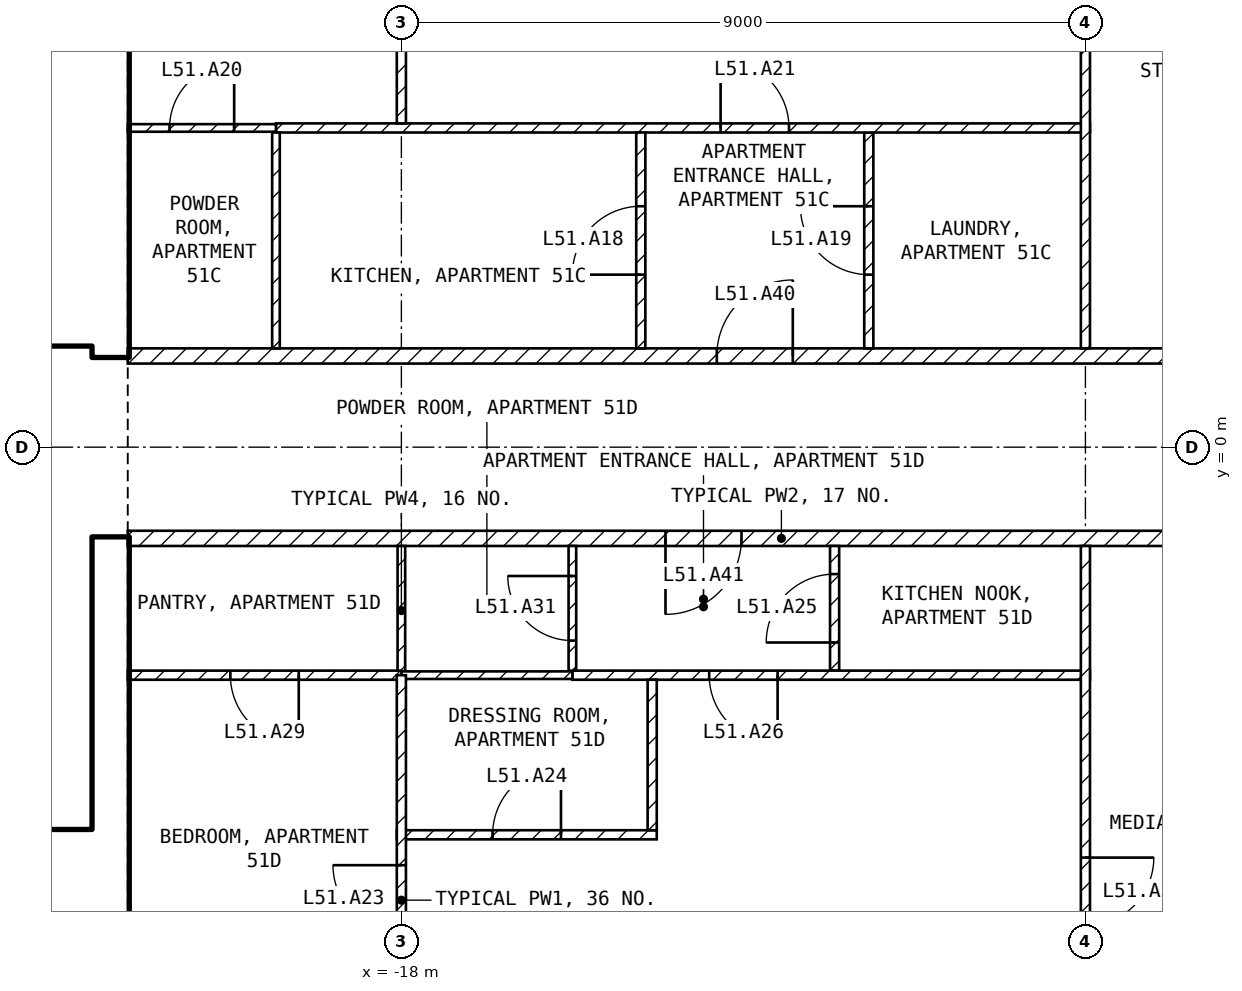
"""IFC4 building model, lengths in metres.
Left out: names, types, materials, properties, quantities, classifications, styles, units other than length and angle.
Written with IfcOpenShell. Run it as: python <this file> out.ifc"""

import sys

from ifc_helpers import new_model, si_unit, direction, frame, frame_2d, origin, place, context, subcontext, project, spatial, rectangle, extrude, element, fill, save


model = new_model("IFC4")
c1 = context("Model", 3, precision=1e-05, world=origin(), true_north=direction((0.0, 1.0)))
c2 = subcontext(c1, "Body", "Model", "MODEL_VIEW")
j1 = project(units=[si_unit("LENGTHUNIT", "METRE"), si_unit("PLANEANGLEUNIT", "RADIAN")], contexts=[c1])
p1 = place(None, origin())
s1 = spatial("IfcSite", under=j1, at=p1, CompositionType="ELEMENT")
p2 = place(p1, origin())
s2 = spatial("IfcBuilding", under=s1, at=p2, CompositionType="ELEMENT")
p3 = place(p2, frame((0.0, 0.0, 205.1)))
s3 = spatial("IfcBuildingStorey", under=s2, at=p3, CompositionType="ELEMENT", Elevation=205.1)
for number, where, z_axis, x_axis in (
    (1, (-21.825, -8.1, 0.0), (0.0, 0.0, 1.0), (0.0, 1.0, 0.0)),
    (2, (-21.825, 1.2, 0.0), (0.0, 0.0, 1.0), (0.0, 1.0, 0.0)),
):
    element("IfcWall", number, at=place(p3, frame(where, z_axis=z_axis, x_axis=x_axis)), inside=s3, PredefinedType="SHEAR", context=c2, shape_type="SweptSolid", body=[
        extrude(rectangle(XDim=6.9, YDim=0.45, at=frame_2d((3.45, 0.0))), origin(), (0.0, 0.0, 1.0), 3.25),
    ])
p4 = place(p3, frame((-33.2, 1.45, 0.0), z_axis=(0.0, 0.0, 1.0), x_axis=(1.0, 0.0, 0.0)))
e3 = element("IfcWall", 3, at=p4, inside=s3, PredefinedType="SOLIDWALL", context=c2, shape_type="SweptSolid", body=[
    extrude(rectangle(XDim=11.15, YDim=0.2, at=frame_2d((5.575, 0.0))), origin(), (0.0, 0.0, 1.0), 3.25),
])
p5 = place(p4, frame((9.4, 0.0, 0.0)))
e4 = element("IfcOpeningElement", 4, at=p5, cuts=e3, PredefinedType="OPENING", context=c2, shape_type="SweptSolid", body=[
    extrude(rectangle(XDim=1.0, YDim=2.1, at=frame_2d((0.5, 1.05))), frame((0.0, 0.11, 0.0), z_axis=(0.0, -1.0, 0.0), x_axis=(1.0, 0.0, 0.0)), (0.0, 0.0, 1.0), 0.22),
])
p6 = place(p4, frame((6.9, 0.0, 0.0)))
e5 = element("IfcOpeningElement", 5, at=p6, cuts=e3, PredefinedType="OPENING", context=c2, shape_type="SweptSolid", body=[
    extrude(rectangle(XDim=1.0, YDim=2.1, at=frame_2d((0.5, 1.05))), frame((0.0, 0.11, 0.0), z_axis=(0.0, -1.0, 0.0), x_axis=(1.0, 0.0, 0.0)), (0.0, 0.0, 1.0), 0.22),
])
p7 = place(p4, frame((1.1, 0.0, 0.0)))
e6 = element("IfcOpeningElement", 6, at=p7, cuts=e3, PredefinedType="OPENING", context=c2, shape_type="SweptSolid", body=[
    extrude(rectangle(XDim=0.9, YDim=2.1, at=frame_2d((0.45, 1.05))), frame((0.0, 0.11, 0.0), z_axis=(0.0, -1.0, 0.0), x_axis=(1.0, 0.0, 0.0)), (0.0, 0.0, 1.0), 0.22),
])
p8 = place(p3, frame((-28.35, 5.15, 0.0), z_axis=(0.0, 0.0, 1.0), x_axis=(1.0, 0.0, 0.0)))
e7 = element("IfcWall", 7, at=p8, inside=s3, PredefinedType="SOLIDWALL", context=c2, shape_type="SweptSolid", body=[
    extrude(rectangle(XDim=6.3, YDim=0.2, at=frame_2d((3.15, 0.0))), origin(), (0.0, 0.0, 1.0), 3.25),
])
p9 = place(p8, frame((5.1, 0.0, 0.0)))
e8 = element("IfcOpeningElement", 8, at=p9, cuts=e7, PredefinedType="OPENING", context=c2, shape_type="SweptSolid", body=[
    extrude(rectangle(XDim=1.0, YDim=2.1, at=frame_2d((0.5, 1.05))), frame((0.0, 0.11, 0.0), z_axis=(0.0, -1.0, 0.0), x_axis=(1.0, 0.0, 0.0)), (0.0, 0.0, 1.0), 0.22),
])
p10 = place(p3, frame((-28.35, -5.15, 0.0), z_axis=(0.0, 0.0, 1.0), x_axis=(1.0, 0.0, 0.0)))
e9 = element("IfcWall", 9, at=p10, inside=s3, PredefinedType="SOLIDWALL", context=c2, shape_type="SweptSolid", body=[
    extrude(rectangle(XDim=6.3, YDim=0.2, at=frame_2d((3.15, 0.0))), origin(), (0.0, 0.0, 1.0), 3.25),
])
p11 = place(p10, frame((5.1, 0.0, 0.0)))
e10 = element("IfcOpeningElement", 10, at=p11, cuts=e9, PredefinedType="OPENING", context=c2, shape_type="SweptSolid", body=[
    extrude(rectangle(XDim=1.0, YDim=2.1, at=frame_2d((0.5, 1.05))), frame((0.0, 0.11, 0.0), z_axis=(0.0, -1.0, 0.0), x_axis=(1.0, 0.0, 0.0)), (0.0, 0.0, 1.0), 0.22),
])
p12 = place(p3, frame((-21.6, 1.2, 0.0), z_axis=(0.0, 0.0, 1.0), x_axis=(1.0, 0.0, 0.0)))
e11 = element("IfcWall", 11, at=p12, inside=s3, PredefinedType="PARTITIONING", context=c2, shape_type="SweptSolid", body=[
    extrude(rectangle(XDim=17.2, YDim=0.2, at=frame_2d((8.6, 0.0))), origin(), (0.0, 0.0, 1.0), 3.25),
])
p13 = place(p12, frame((7.75, 0.0, 0.0)))
e12 = element("IfcOpeningElement", 12, at=p13, cuts=e11, PredefinedType="OPENING", context=c2, shape_type="SweptSolid", body=[
    extrude(rectangle(XDim=1.0, YDim=2.1, at=frame_2d((0.5, 1.05))), frame((0.0, 0.11, 0.0), z_axis=(0.0, -1.0, 0.0), x_axis=(1.0, 0.0, 0.0)), (0.0, 0.0, 1.0), 0.22),
])
p14 = place(p3, frame((-4.4, -1.2, 0.0), z_axis=(0.0, 0.0, 1.0), x_axis=(-1.0, 0.0, 0.0)))
e13 = element("IfcWall", 13, at=p14, inside=s3, PredefinedType="PARTITIONING", context=c2, shape_type="SweptSolid", body=[
    extrude(rectangle(XDim=17.2, YDim=0.2, at=frame_2d((8.6, 0.0))), origin(), (0.0, 0.0, 1.0), 3.25),
])
p15 = place(p14, frame((9.125, 0.0, 0.0)))
e14 = element("IfcOpeningElement", 14, at=p15, cuts=e13, PredefinedType="OPENING", context=c2, shape_type="SweptSolid", body=[
    extrude(rectangle(XDim=1.0, YDim=2.1, at=frame_2d((0.5, 1.05))), frame((0.0, 0.11, 0.0), z_axis=(0.0, -1.0, 0.0), x_axis=(1.0, 0.0, 0.0)), (0.0, 0.0, 1.0), 0.22),
])
p16 = place(p3, frame((-11.85, 1.3, 0.0), z_axis=(0.0, 0.0, 1.0), x_axis=(0.0, 1.0, 0.0)))
e15 = element("IfcWall", 15, at=p16, inside=s3, PredefinedType="PARTITIONING", context=c2, shape_type="SweptSolid", body=[
    extrude(rectangle(XDim=2.84, YDim=0.12, at=frame_2d((1.42, 0.0))), origin(), (0.0, 0.0, 1.0), 3.25),
])
p17 = place(p16, frame((0.97, 0.0, 0.0)))
e16 = element("IfcOpeningElement", 16, at=p17, cuts=e15, PredefinedType="OPENING", context=c2, shape_type="SweptSolid", body=[
    extrude(rectangle(XDim=0.9, YDim=2.1, at=frame_2d((0.45, 1.05))), frame((0.0, 0.07, 0.0), z_axis=(0.0, -1.0, 0.0), x_axis=(1.0, 0.0, 0.0)), (0.0, 0.0, 1.0), 0.14),
])
p18 = place(p3, frame((-19.65, 4.2, 0.0), z_axis=(0.0, 0.0, 1.0), x_axis=(1.0, 0.0, 0.0)))
e17 = element("IfcWall", 17, at=p18, inside=s3, PredefinedType="PARTITIONING", context=c2, shape_type="SweptSolid", body=[
    extrude(rectangle(XDim=10.71, YDim=0.12, at=frame_2d((5.355, 0.0))), origin(), (0.0, 0.0, 1.0), 3.25),
])
p19 = place(p18, frame((5.85, 0.0, 0.0)))
e18 = element("IfcOpeningElement", 18, at=p19, cuts=e17, PredefinedType="OPENING", context=c2, shape_type="SweptSolid", body=[
    extrude(rectangle(XDim=0.9, YDim=2.1, at=frame_2d((0.45, 1.05))), frame((0.0, 0.07, 0.0), z_axis=(0.0, -1.0, 0.0), x_axis=(1.0, 0.0, 0.0)), (0.0, 0.0, 1.0), 0.14),
])
p20 = place(p3, frame((-9.0, 8.92, 0.0), z_axis=(0.0, 0.0, 1.0), x_axis=(0.0, -1.0, 0.0)))
e19 = element("IfcWall", 19, at=p20, inside=s3, PredefinedType="PARTITIONING", context=c2, shape_type="SweptSolid", body=[
    extrude(rectangle(XDim=7.62, YDim=0.12, at=frame_2d((3.81, 0.0))), origin(), (0.0, 0.0, 1.0), 3.25),
])
p21 = place(p20, frame((2.52, 0.0, 0.0)))
e20 = element("IfcOpeningElement", 20, at=p21, cuts=e19, PredefinedType="OPENING", context=c2, shape_type="SweptSolid", body=[
    extrude(rectangle(XDim=0.9, YDim=2.1, at=frame_2d((0.45, 1.05))), frame((0.0, 0.07, 0.0), z_axis=(0.0, -1.0, 0.0), x_axis=(1.0, 0.0, 0.0)), (0.0, 0.0, 1.0), 0.14),
])
p22 = place(p3, frame((-14.85, 1.3, 0.0), z_axis=(0.0, 0.0, 1.0), x_axis=(0.0, 1.0, 0.0)))
e21 = element("IfcWall", 21, at=p22, inside=s3, PredefinedType="PARTITIONING", context=c2, shape_type="SweptSolid", body=[
    extrude(rectangle(XDim=2.84, YDim=0.12, at=frame_2d((1.42, 0.0))), origin(), (0.0, 0.0, 1.0), 3.25),
])
p23 = place(p22, frame((0.97, 0.0, 0.0)))
e22 = element("IfcOpeningElement", 22, at=p23, cuts=e21, PredefinedType="OPENING", context=c2, shape_type="SweptSolid", body=[
    extrude(rectangle(XDim=0.9, YDim=2.1, at=frame_2d((0.45, 1.05))), frame((0.0, 0.07, 0.0), z_axis=(0.0, -1.0, 0.0), x_axis=(1.0, 0.0, 0.0)), (0.0, 0.0, 1.0), 0.14),
])
p24 = place(p3, frame((-19.65, 1.3, 0.0), z_axis=(0.0, 0.0, 1.0), x_axis=(0.0, 1.0, 0.0)))
e23 = element("IfcWall", 23, at=p24, inside=s3, PredefinedType="PARTITIONING", context=c2, shape_type="SweptSolid", body=[
    extrude(rectangle(XDim=2.84, YDim=0.1, at=frame_2d((1.42, 0.0))), origin(), (0.0, 0.0, 1.0), 3.25),
])
p25 = place(p3, frame((-21.6, 4.2, 0.0), z_axis=(0.0, 0.0, 1.0), x_axis=(1.0, 0.0, 0.0)))
e24 = element("IfcWall", 24, at=p25, inside=s3, PredefinedType="PARTITIONING", context=c2, shape_type="SweptSolid", body=[
    extrude(rectangle(XDim=1.95, YDim=0.1, at=frame_2d((0.975, 0.0))), origin(), (0.0, 0.0, 1.0), 3.25),
])
p26 = place(p25, frame((0.55, 0.0, 0.0)))
e25 = element("IfcOpeningElement", 25, at=p26, cuts=e24, PredefinedType="OPENING", context=c2, shape_type="SweptSolid", body=[
    extrude(rectangle(XDim=0.85, YDim=2.1, at=frame_2d((0.425, 1.05))), frame((0.0, 0.06, 0.0), z_axis=(0.0, -1.0, 0.0), x_axis=(1.0, 0.0, 0.0)), (0.0, 0.0, 1.0), 0.12),
])
p27 = place(p3, frame((-18.0, 4.26, 0.0), z_axis=(0.0, 0.0, 1.0), x_axis=(0.0, 1.0, 0.0)))
e26 = element("IfcWall", 26, at=p27, inside=s3, PredefinedType="PARTITIONING", context=c2, shape_type="SweptSolid", body=[
    extrude(rectangle(XDim=4.66, YDim=0.12, at=frame_2d((2.33, 0.0))), origin(), (0.0, 0.0, 1.0), 2.48),
])
p28 = place(p27, frame((1.22, 0.0, 0.0)))
e27 = element("IfcOpeningElement", 27, at=p28, cuts=e26, PredefinedType="OPENING", context=c2, shape_type="SweptSolid", body=[
    extrude(rectangle(XDim=0.9, YDim=2.1, at=frame_2d((0.45, 1.05))), frame((0.0, 0.07, 0.0), z_axis=(0.0, -1.0, 0.0), x_axis=(1.0, 0.0, 0.0)), (0.0, 0.0, 1.0), 0.14),
])
p29 = place(p3, frame((-12.3, -2.94, 0.0), z_axis=(0.0, 0.0, 1.0), x_axis=(0.0, 1.0, 0.0)))
e28 = element("IfcWall", 28, at=p29, inside=s3, PredefinedType="PARTITIONING", context=c2, shape_type="SweptSolid", body=[
    extrude(rectangle(XDim=1.64, YDim=0.12, at=frame_2d((0.82, 0.0))), origin(), (0.0, 0.0, 1.0), 3.25),
])
p30 = place(p29, frame((0.37, 0.0, 0.0)))
e29 = element("IfcOpeningElement", 29, at=p30, cuts=e28, PredefinedType="OPENING", context=c2, shape_type="SweptSolid", body=[
    extrude(rectangle(XDim=0.9, YDim=2.1, at=frame_2d((0.45, 1.05))), frame((0.0, 0.07, 0.0), z_axis=(0.0, -1.0, 0.0), x_axis=(1.0, 0.0, 0.0)), (0.0, 0.0, 1.0), 0.14),
])
p31 = place(p3, frame((-8.94, -3.0, 0.0), z_axis=(0.0, 0.0, 1.0), x_axis=(-1.0, 0.0, 0.0)))
e30 = element("IfcWall", 30, at=p31, inside=s3, PredefinedType="PARTITIONING", context=c2, shape_type="SweptSolid", body=[
    extrude(rectangle(XDim=6.81, YDim=0.12, at=frame_2d((3.405, 0.0))), origin(), (0.0, 0.0, 1.0), 3.25),
])
p32 = place(p31, frame((4.11, 0.0, 0.0)))
e31 = element("IfcOpeningElement", 31, at=p32, cuts=e30, PredefinedType="OPENING", context=c2, shape_type="SweptSolid", body=[
    extrude(rectangle(XDim=0.9, YDim=2.1, at=frame_2d((0.45, 1.05))), frame((0.0, 0.07, 0.0), z_axis=(0.0, -1.0, 0.0), x_axis=(1.0, 0.0, 0.0)), (0.0, 0.0, 1.0), 0.14),
])
p33 = place(p3, frame((-9.0, -1.3, 0.0), z_axis=(0.0, 0.0, 1.0), x_axis=(0.0, -1.0, 0.0)))
e32 = element("IfcWall", 32, at=p33, inside=s3, PredefinedType="PARTITIONING", context=c2, shape_type="SweptSolid", body=[
    extrude(rectangle(XDim=7.62, YDim=0.12, at=frame_2d((3.81, 0.0))), origin(), (0.0, 0.0, 1.0), 3.25),
])
p34 = place(p33, frame((4.1, 0.0, 0.0)))
e33 = element("IfcOpeningElement", 33, at=p34, cuts=e32, PredefinedType="OPENING", context=c2, shape_type="SweptSolid", body=[
    extrude(rectangle(XDim=0.9, YDim=2.1, at=frame_2d((0.45, 1.05))), frame((0.0, 0.07, 0.0), z_axis=(0.0, -1.0, 0.0), x_axis=(1.0, 0.0, 0.0)), (0.0, 0.0, 1.0), 0.14),
])
p35 = place(p3, frame((-15.75, -2.94, 0.0), z_axis=(0.0, 0.0, 1.0), x_axis=(0.0, 1.0, 0.0)))
e34 = element("IfcWall", 34, at=p35, inside=s3, PredefinedType="PARTITIONING", context=c2, shape_type="SweptSolid", body=[
    extrude(rectangle(XDim=1.64, YDim=0.1, at=frame_2d((0.82, 0.0))), origin(), (0.0, 0.0, 1.0), 3.25),
])
p36 = place(p35, frame((0.395, 0.0, 0.0)))
e35 = element("IfcOpeningElement", 35, at=p36, cuts=e34, PredefinedType="OPENING", context=c2, shape_type="SweptSolid", body=[
    extrude(rectangle(XDim=0.85, YDim=2.1, at=frame_2d((0.425, 1.05))), frame((0.0, 0.06, 0.0), z_axis=(0.0, -1.0, 0.0), x_axis=(1.0, 0.0, 0.0)), (0.0, 0.0, 1.0), 0.12),
])
p37 = place(p3, frame((-18.0, -3.0, 0.0), z_axis=(0.0, 0.0, 1.0), x_axis=(0.0, 1.0, 0.0)))
e36 = element("IfcWall", 36, at=p37, inside=s3, PredefinedType="PARTITIONING", context=c2, shape_type="SweptSolid", body=[
    extrude(rectangle(XDim=1.7, YDim=0.1, at=frame_2d((0.85, 0.0))), origin(), (0.0, 0.0, 1.0), 2.48),
])
p38 = place(p3, frame((-15.75, -3.0, 0.0), z_axis=(0.0, 0.0, 1.0), x_axis=(-1.0, 0.0, 0.0)))
e37 = element("IfcWall", 37, at=p38, inside=s3, PredefinedType="PARTITIONING", context=c2, shape_type="SweptSolid", body=[
    extrude(rectangle(XDim=2.25, YDim=0.1, at=frame_2d((1.125, 0.0))), origin(), (0.0, 0.0, 1.0), 3.25),
])
p39 = place(p3, frame((-18.0, -3.0, 0.0), z_axis=(0.0, 0.0, 1.0), x_axis=(-1.0, 0.0, 0.0)))
e38 = element("IfcWall", 38, at=p39, inside=s3, PredefinedType="PARTITIONING", context=c2, shape_type="SweptSolid", body=[
    extrude(rectangle(XDim=3.6, YDim=0.12, at=frame_2d((1.8, 0.0))), origin(), (0.0, 0.0, 1.0), 3.25),
])
p40 = place(p39, frame((1.35, 0.0, 0.0)))
e39 = element("IfcOpeningElement", 39, at=p40, cuts=e38, PredefinedType="OPENING", context=c2, shape_type="SweptSolid", body=[
    extrude(rectangle(XDim=0.9, YDim=2.1, at=frame_2d((0.45, 1.05))), frame((0.0, 0.07, 0.0), z_axis=(0.0, -1.0, 0.0), x_axis=(1.0, 0.0, 0.0)), (0.0, 0.0, 1.0), 0.14),
])
p41 = place(p3, frame((-18.06, -5.1, 0.0), z_axis=(0.0, 0.0, 1.0), x_axis=(1.0, 0.0, 0.0)))
e40 = element("IfcWall", 40, at=p41, inside=s3, PredefinedType="PARTITIONING", context=c2, shape_type="SweptSolid", body=[
    extrude(rectangle(XDim=3.42, YDim=0.12, at=frame_2d((1.71, 0.0))), origin(), (0.0, 0.0, 1.0), 3.25),
])
p42 = place(p41, frame((1.26, 0.0, 0.0)))
e41 = element("IfcOpeningElement", 41, at=p42, cuts=e40, PredefinedType="OPENING", context=c2, shape_type="SweptSolid", body=[
    extrude(rectangle(XDim=0.9, YDim=2.1, at=frame_2d((0.45, 1.05))), frame((0.0, 0.07, 0.0), z_axis=(0.0, -1.0, 0.0), x_axis=(1.0, 0.0, 0.0)), (0.0, 0.0, 1.0), 0.14),
])
p43 = place(p3, frame((-14.7, -5.04, 0.0), z_axis=(0.0, 0.0, 1.0), x_axis=(0.0, 1.0, 0.0)))
e42 = element("IfcWall", 42, at=p43, inside=s3, PredefinedType="PARTITIONING", context=c2, shape_type="SweptSolid", body=[
    extrude(rectangle(XDim=1.98, YDim=0.12, at=frame_2d((0.99, 0.0))), origin(), (0.0, 0.0, 1.0), 3.25),
])
p44 = place(p3, frame((-18.0, -8.92, 0.0), z_axis=(0.0, 0.0, 1.0), x_axis=(0.0, 1.0, 0.0)))
e43 = element("IfcWall", 43, at=p44, inside=s3, PredefinedType="PARTITIONING", context=c2, shape_type="SweptSolid", body=[
    extrude(rectangle(XDim=5.92, YDim=0.12, at=frame_2d((2.96, 0.0))), origin(), (0.0, 0.0, 1.0), 2.48),
])
p45 = place(p44, frame((2.52, 0.0, 0.0)))
e44 = element("IfcOpeningElement", 44, at=p45, cuts=e43, PredefinedType="OPENING", context=c2, shape_type="SweptSolid", body=[
    extrude(rectangle(XDim=0.9, YDim=2.1, at=frame_2d((0.45, 1.05))), frame((0.0, 0.07, 0.0), z_axis=(0.0, -1.0, 0.0), x_axis=(1.0, 0.0, 0.0)), (0.0, 0.0, 1.0), 0.14),
])
p46 = place(p11, origin())
e45 = element("IfcDoor", 45, at=p46, inside=s3, OperationType="SINGLE_SWING_LEFT", PredefinedType="DOOR", context=c2, shape_type="SweptSolid", body=[
    extrude(rectangle(XDim=1.0, YDim=2.1, at=frame_2d((0.5, 1.05))), frame((0.0, 0.025, 0.0), z_axis=(0.0, -1.0, 0.0), x_axis=(1.0, 0.0, 0.0)), (0.0, 0.0, 1.0), 0.05),
])
fill(e10, e45)
p47 = place(p9, origin())
e46 = element("IfcDoor", 46, at=p47, inside=s3, OperationType="SINGLE_SWING_LEFT", PredefinedType="DOOR", context=c2, shape_type="SweptSolid", body=[
    extrude(rectangle(XDim=1.0, YDim=2.1, at=frame_2d((0.5, 1.05))), frame((0.0, 0.025, 0.0), z_axis=(0.0, -1.0, 0.0), x_axis=(1.0, 0.0, 0.0)), (0.0, 0.0, 1.0), 0.05),
])
fill(e8, e46)
p48 = place(p23, origin())
e47 = element("IfcDoor", 47, at=p48, inside=s3, OperationType="SINGLE_SWING_LEFT", PredefinedType="DOOR", context=c2, shape_type="SweptSolid", body=[
    extrude(rectangle(XDim=0.9, YDim=2.1, at=frame_2d((0.45, 1.05))), frame((0.0, 0.025, 0.0), z_axis=(0.0, -1.0, 0.0), x_axis=(1.0, 0.0, 0.0)), (0.0, 0.0, 1.0), 0.05),
])
fill(e22, e47)
p49 = place(p17, origin())
e48 = element("IfcDoor", 48, at=p49, inside=s3, OperationType="SINGLE_SWING_RIGHT", PredefinedType="DOOR", context=c2, shape_type="SweptSolid", body=[
    extrude(rectangle(XDim=0.9, YDim=2.1, at=frame_2d((0.45, 1.05))), frame((0.0, 0.025, 0.0), z_axis=(0.0, -1.0, 0.0), x_axis=(1.0, 0.0, 0.0)), (0.0, 0.0, 1.0), 0.05),
])
fill(e16, e48)
p50 = place(p26, origin())
e49 = element("IfcDoor", 49, at=p50, inside=s3, OperationType="SINGLE_SWING_RIGHT", PredefinedType="DOOR", context=c2, shape_type="SweptSolid", body=[
    extrude(rectangle(XDim=0.85, YDim=2.1, at=frame_2d((0.425, 1.05))), frame((0.0, 0.025, 0.0), z_axis=(0.0, -1.0, 0.0), x_axis=(1.0, 0.0, 0.0)), (0.0, 0.0, 1.0), 0.05),
])
fill(e25, e49)
p51 = place(p19, origin())
e50 = element("IfcDoor", 50, at=p51, inside=s3, OperationType="SINGLE_SWING_LEFT", PredefinedType="DOOR", context=c2, shape_type="SweptSolid", body=[
    extrude(rectangle(XDim=0.9, YDim=2.1, at=frame_2d((0.45, 1.05))), frame((0.0, 0.025, 0.0), z_axis=(0.0, -1.0, 0.0), x_axis=(1.0, 0.0, 0.0)), (0.0, 0.0, 1.0), 0.05),
])
fill(e18, e50)
p52 = place(p45, origin())
e51 = element("IfcDoor", 51, at=p52, inside=s3, OperationType="SINGLE_SWING_RIGHT", PredefinedType="DOOR", context=c2, shape_type="SweptSolid", body=[
    extrude(rectangle(XDim=0.9, YDim=2.1, at=frame_2d((0.45, 1.05))), frame((0.0, 0.025, 0.0), z_axis=(0.0, -1.0, 0.0), x_axis=(1.0, 0.0, 0.0)), (0.0, 0.0, 1.0), 0.05),
])
fill(e44, e51)
p53 = place(p42, origin())
e52 = element("IfcDoor", 52, at=p53, inside=s3, OperationType="SINGLE_SWING_RIGHT", PredefinedType="DOOR", context=c2, shape_type="SweptSolid", body=[
    extrude(rectangle(XDim=0.9, YDim=2.1, at=frame_2d((0.45, 1.05))), frame((0.0, 0.025, 0.0), z_axis=(0.0, -1.0, 0.0), x_axis=(1.0, 0.0, 0.0)), (0.0, 0.0, 1.0), 0.05),
])
fill(e41, e52)
p54 = place(p30, origin())
e53 = element("IfcDoor", 53, at=p54, inside=s3, OperationType="SINGLE_SWING_LEFT", PredefinedType="DOOR", context=c2, shape_type="SweptSolid", body=[
    extrude(rectangle(XDim=0.9, YDim=2.1, at=frame_2d((0.45, 1.05))), frame((0.0, 0.025, 0.0), z_axis=(0.0, -1.0, 0.0), x_axis=(1.0, 0.0, 0.0)), (0.0, 0.0, 1.0), 0.05),
])
fill(e29, e53)
p55 = place(p32, origin())
e54 = element("IfcDoor", 54, at=p55, inside=s3, OperationType="SINGLE_SWING_LEFT", PredefinedType="DOOR", context=c2, shape_type="SweptSolid", body=[
    extrude(rectangle(XDim=0.9, YDim=2.1, at=frame_2d((0.45, 1.05))), frame((0.0, 0.025, 0.0), z_axis=(0.0, -1.0, 0.0), x_axis=(1.0, 0.0, 0.0)), (0.0, 0.0, 1.0), 0.05),
])
fill(e31, e54)
p56 = place(p34, origin())
e55 = element("IfcDoor", 55, at=p56, inside=s3, OperationType="SINGLE_SWING_LEFT", PredefinedType="DOOR", context=c2, shape_type="SweptSolid", body=[
    extrude(rectangle(XDim=0.9, YDim=2.1, at=frame_2d((0.45, 1.05))), frame((0.0, 0.025, 0.0), z_axis=(0.0, -1.0, 0.0), x_axis=(1.0, 0.0, 0.0)), (0.0, 0.0, 1.0), 0.05),
])
fill(e33, e55)
p57 = place(p40, origin())
e56 = element("IfcDoor", 56, at=p57, inside=s3, OperationType="SINGLE_SWING_LEFT", PredefinedType="DOOR", context=c2, shape_type="SweptSolid", body=[
    extrude(rectangle(XDim=0.9, YDim=2.1, at=frame_2d((0.45, 1.05))), frame((0.0, 0.025, 0.0), z_axis=(0.0, -1.0, 0.0), x_axis=(1.0, 0.0, 0.0)), (0.0, 0.0, 1.0), 0.05),
])
fill(e39, e56)
p58 = place(p36, origin())
e57 = element("IfcDoor", 57, at=p58, inside=s3, OperationType="SINGLE_SWING_RIGHT", PredefinedType="DOOR", context=c2, shape_type="SweptSolid", body=[
    extrude(rectangle(XDim=0.85, YDim=2.1, at=frame_2d((0.425, 1.05))), frame((0.0, 0.025, 0.0), z_axis=(0.0, -1.0, 0.0), x_axis=(1.0, 0.0, 0.0)), (0.0, 0.0, 1.0), 0.05),
])
fill(e35, e57)
p59 = place(p13, origin())
e58 = element("IfcDoor", 58, at=p59, inside=s3, OperationType="SINGLE_SWING_RIGHT", PredefinedType="DOOR", context=c2, shape_type="SweptSolid", body=[
    extrude(rectangle(XDim=1.0, YDim=2.1, at=frame_2d((0.5, 1.05))), frame((0.0, 0.025, 0.0), z_axis=(0.0, -1.0, 0.0), x_axis=(1.0, 0.0, 0.0)), (0.0, 0.0, 1.0), 0.05),
])
fill(e12, e58)
p60 = place(p15, origin())
e59 = element("IfcDoor", 59, at=p60, inside=s3, OperationType="SINGLE_SWING_RIGHT", PredefinedType="DOOR", context=c2, shape_type="SweptSolid", body=[
    extrude(rectangle(XDim=1.0, YDim=2.1, at=frame_2d((0.5, 1.05))), frame((0.0, 0.025, 0.0), z_axis=(0.0, -1.0, 0.0), x_axis=(1.0, 0.0, 0.0)), (0.0, 0.0, 1.0), 0.05),
])
fill(e14, e59)
save(model, sys.argv[1])
